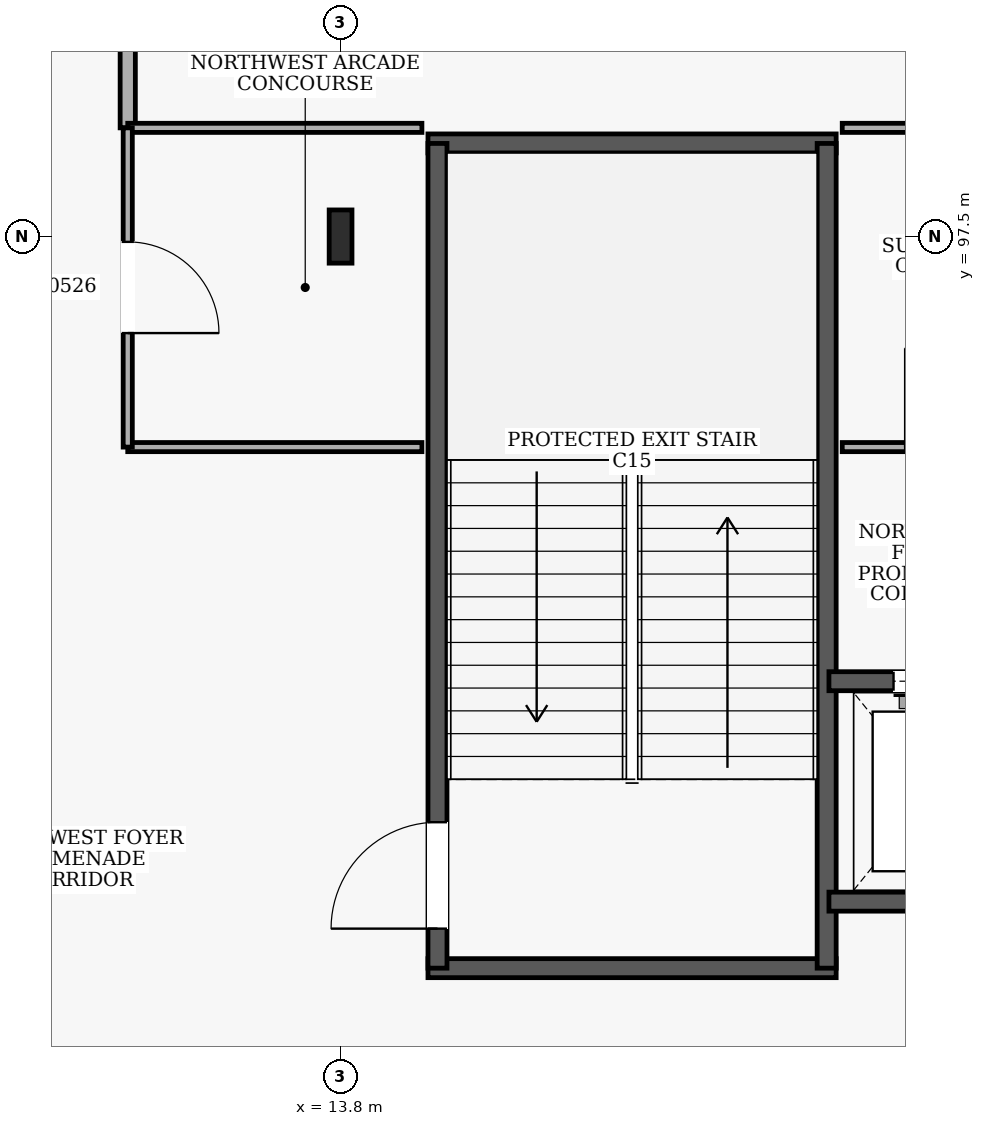
"""IFC4 building model, lengths in metres.
Left out: names, types, materials, properties, quantities, classifications, styles, units other than length and angle.
Written with IfcOpenShell. Run it as: python <this file> out.ifc"""

import sys

from ifc_helpers import new_model, si_unit, direction, frame, frame_2d, origin, origin_2d, place, context, subcontext, project, spatial, rectangle, i_section, extrude, element, fill, save


model = new_model("IFC4")
c1 = context("Model", 3, precision=1e-05, world=origin(), true_north=direction((0.0, 1.0)))
c2 = subcontext(c1, "Body", "Model", "MODEL_VIEW")
j1 = project(units=[si_unit("LENGTHUNIT", "METRE"), si_unit("PLANEANGLEUNIT", "RADIAN")], contexts=[c1])
p1 = place(None, origin())
s1 = spatial("IfcSite", under=j1, at=p1, CompositionType="ELEMENT")
p2 = place(p1, origin())
s2 = spatial("IfcBuilding", under=s1, at=p2, CompositionType="ELEMENT")
p3 = place(p2, frame((0.0, 0.0, 5.4)))
s3 = spatial("IfcBuildingStorey", under=s2, at=p3, CompositionType="ELEMENT", Elevation=5.4)
p4 = place(p3, frame((13.8, 97.5, 0.0), z_axis=(0.0, 0.0, 1.0), x_axis=(1.0, 0.0, 0.0)))
e1 = element("IfcColumn", 1, at=p4, inside=s3, PredefinedType="COLUMN", context=c2, shape_type="SweptSolid", body=[
    extrude(i_section(OverallWidth=0.3, OverallDepth=0.7, WebThickness=0.017, FlangeThickness=0.032, at=origin_2d()), origin(), (0.0, 0.0, 1.0), 4.8),
])
for number, where, z_axis, x_axis in (
    (2, (14.95, 87.875, 0.0), (0.0, 0.0, 1.0), (1.0, 0.0, 0.0)),
    (3, (20.32, 98.725, 0.0), (0.0, 0.0, 1.0), (-1.0, 0.0, 0.0)),
):
    element("IfcWall", number, at=place(p3, frame(where, z_axis=z_axis, x_axis=x_axis)), inside=s3, PredefinedType="SHEAR", context=c2, shape_type="SweptSolid", body=[
        extrude(rectangle(XDim=5.37, YDim=0.25, at=frame_2d((2.685, 0.0))), origin(), (0.0, 0.0, 1.0), 4.5),
    ])
p5 = place(p3, frame((15.075, 87.875, 0.0), z_axis=(0.0, 0.0, 1.0), x_axis=(0.0, 1.0, 0.0)))
e4 = element("IfcWall", 4, at=p5, inside=s3, PredefinedType="SHEAR", context=c2, shape_type="SweptSolid", body=[
    extrude(rectangle(XDim=10.85, YDim=0.25, at=frame_2d((5.425, 0.0))), origin(), (0.0, 0.0, 1.0), 4.5),
])
p6 = place(p5, frame((0.52, 0.0, 0.0)))
e5 = element("IfcOpeningElement", 5, at=p6, cuts=e4, PredefinedType="OPENING", context=c2, shape_type="SweptSolid", body=[
    extrude(rectangle(XDim=1.4, YDim=2.15, at=frame_2d((0.7, 1.075))), frame((0.0, 0.135, 0.0), z_axis=(0.0, -1.0, 0.0), x_axis=(1.0, 0.0, 0.0)), (0.0, 0.0, 1.0), 0.27),
])
p7 = place(p3, frame((20.195, 87.875, 0.0), z_axis=(0.0, 0.0, 1.0), x_axis=(0.0, 1.0, 0.0)))
e6 = element("IfcWall", 6, at=p7, inside=s3, PredefinedType="SHEAR", context=c2, shape_type="SweptSolid", body=[
    extrude(rectangle(XDim=10.85, YDim=0.25, at=frame_2d((5.425, 0.0))), origin(), (0.0, 0.0, 1.0), 4.5),
])
p8 = place(p3, frame((20.225, 88.75, 0.0), z_axis=(0.0, 0.0, 1.0), x_axis=(1.0, 0.0, 0.0)))
e7 = element("IfcWall", 7, at=p8, inside=s3, PredefinedType="SHEAR", context=c2, shape_type="SweptSolid", body=[
    extrude(rectangle(XDim=2.75, YDim=0.25, at=frame_2d((1.375, 0.0))), origin(), (0.0, 0.0, 1.0), 4.5),
])
p9 = place(p3, frame((22.975, 91.65, 0.0), z_axis=(0.0, 0.0, 1.0), x_axis=(-1.0, 0.0, 0.0)))
e8 = element("IfcWall", 8, at=p9, inside=s3, PredefinedType="SHEAR", context=c2, shape_type="SweptSolid", body=[
    extrude(rectangle(XDim=2.75, YDim=0.25, at=frame_2d((1.375, 0.0))), origin(), (0.0, 0.0, 1.0), 4.5),
])
p10 = place(p9, frame((0.85, 0.0, 0.0)))
e9 = element("IfcOpeningElement", 9, at=p10, cuts=e8, PredefinedType="OPENING", context=c2, shape_type="SweptSolid", body=[
    extrude(rectangle(XDim=1.05, YDim=2.15, at=frame_2d((0.525, 1.075))), frame((0.0, 0.135, 0.0), z_axis=(0.0, -1.0, 0.0), x_axis=(1.0, 0.0, 0.0)), (0.0, 0.0, 1.0), 0.27),
])
p11 = place(p3, frame((11.0, 111.05, 0.0), z_axis=(0.0, 0.0, 1.0), x_axis=(0.0, -1.0, 0.0)))
e10 = element("IfcWall", 10, at=p11, inside=s3, PredefinedType="PARTITIONING", context=c2, shape_type="SweptSolid", body=[
    extrude(rectangle(XDim=12.12, YDim=0.2, at=frame_2d((6.06, 0.0))), origin(), (0.0, 0.0, 1.0), 4.5),
])
p12 = place(p11, frame((5.5, 0.0, 0.0)))
e11 = element("IfcOpeningElement", 11, at=p12, cuts=e10, PredefinedType="OPENING", context=c2, shape_type="SweptSolid", body=[
    extrude(rectangle(XDim=1.12, YDim=2.15, at=frame_2d((0.56, 1.075))), frame((0.0, 0.11, 0.0), z_axis=(0.0, -1.0, 0.0), x_axis=(1.0, 0.0, 0.0)), (0.0, 0.0, 1.0), 0.22),
])
for number, where, z_axis, x_axis in (
    (12, (11.0, 94.73, 0.0), (0.0, 0.0, 1.0), (1.0, 0.0, 0.0)),
    (13, (14.87, 98.93, 0.0), (0.0, 0.0, 1.0), (-1.0, 0.0, 0.0)),
):
    element("IfcWall", number, at=place(p3, frame(where, z_axis=z_axis, x_axis=x_axis)), inside=s3, PredefinedType="PARTITIONING", context=c2, shape_type="SweptSolid", body=[
        extrude(rectangle(XDim=3.87, YDim=0.12, at=frame_2d((1.935, 0.0))), origin(), (0.0, 0.0, 1.0), 4.5),
    ])
p13 = place(p3, frame((11.0, 98.93, 0.0), z_axis=(0.0, 0.0, 1.0), x_axis=(0.0, -1.0, 0.0)))
e14 = element("IfcWall", 14, at=p13, inside=s3, PredefinedType="PARTITIONING", context=c2, shape_type="SweptSolid", body=[
    extrude(rectangle(XDim=4.2, YDim=0.12, at=frame_2d((2.1, 0.0))), origin(), (0.0, 0.0, 1.0), 4.5),
])
p14 = place(p13, frame((1.5, 0.0, 0.0)))
e15 = element("IfcOpeningElement", 15, at=p14, cuts=e14, PredefinedType="OPENING", context=c2, shape_type="SweptSolid", body=[
    extrude(rectangle(XDim=1.2, YDim=2.15, at=frame_2d((0.6, 1.075))), frame((0.0, 0.07, 0.0), z_axis=(0.0, -1.0, 0.0), x_axis=(1.0, 0.0, 0.0)), (0.0, 0.0, 1.0), 0.14),
])
p15 = place(p3, frame((20.4, 94.73, 0.0), z_axis=(0.0, 0.0, 1.0), x_axis=(1.0, 0.0, 0.0)))
e16 = element("IfcWall", 16, at=p15, inside=s3, PredefinedType="PARTITIONING", context=c2, shape_type="SweptSolid", body=[
    extrude(rectangle(XDim=2.955, YDim=0.12, at=frame_2d((1.478, 0.0))), origin(), (0.0, 0.0, 1.0), 4.5),
])
p16 = place(p15, frame((0.827, 0.0, 0.0)))
e17 = element("IfcOpeningElement", 17, at=p16, cuts=e16, PredefinedType="OPENING", context=c2, shape_type="SweptSolid", body=[
    extrude(rectangle(XDim=1.3, YDim=2.2, at=frame_2d((0.65, 1.1))), frame((0.0, 0.07, 0.0), z_axis=(0.0, -1.0, 0.0), x_axis=(1.0, 0.0, 0.0)), (0.0, 0.0, 1.0), 0.14),
])
p17 = place(p3, frame((23.355, 98.93, 0.0), z_axis=(0.0, 0.0, 1.0), x_axis=(-1.0, 0.0, 0.0)))
e18 = element("IfcWall", 18, at=p17, inside=s3, PredefinedType="PARTITIONING", context=c2, shape_type="SweptSolid", body=[
    extrude(rectangle(XDim=2.955, YDim=0.12, at=frame_2d((1.478, 0.0))), origin(), (0.0, 0.0, 1.0), 4.5),
])
p18 = place(p6, frame((1.4, 0.0, 0.0), z_axis=(0.0, 0.0, 1.0), x_axis=(-1.0, 0.0, 0.0)))
e19 = element("IfcDoor", 19, at=p18, inside=s3, OperationType="SINGLE_SWING_RIGHT", PredefinedType="DOOR", context=c2, shape_type="SweptSolid", body=[
    extrude(rectangle(XDim=1.4, YDim=2.15, at=frame_2d((0.7, 1.075))), frame((0.0, 0.025, 0.0), z_axis=(0.0, -1.0, 0.0), x_axis=(1.0, 0.0, 0.0)), (0.0, 0.0, 1.0), 0.05),
])
fill(e5, e19)
p19 = place(p10, origin())
e20 = element("IfcDoor", 20, at=p19, inside=s3, OperationType="SLIDING_TO_RIGHT", PredefinedType="DOOR", context=c2, shape_type="SweptSolid", body=[
    extrude(rectangle(XDim=1.05, YDim=2.15, at=frame_2d((0.525, 1.075))), frame((0.0, 0.025, 0.0), z_axis=(0.0, -1.0, 0.0), x_axis=(1.0, 0.0, 0.0)), (0.0, 0.0, 1.0), 0.05),
])
fill(e9, e20)
p20 = place(p14, origin())
e21 = element("IfcDoor", 21, at=p20, inside=s3, OperationType="SINGLE_SWING_RIGHT", PredefinedType="DOOR", context=c2, shape_type="SweptSolid", body=[
    extrude(rectangle(XDim=1.2, YDim=2.15, at=frame_2d((0.6, 1.075))), frame((0.0, 0.025, 0.0), z_axis=(0.0, -1.0, 0.0), x_axis=(1.0, 0.0, 0.0)), (0.0, 0.0, 1.0), 0.05),
])
fill(e15, e21)
save(model, sys.argv[1])
